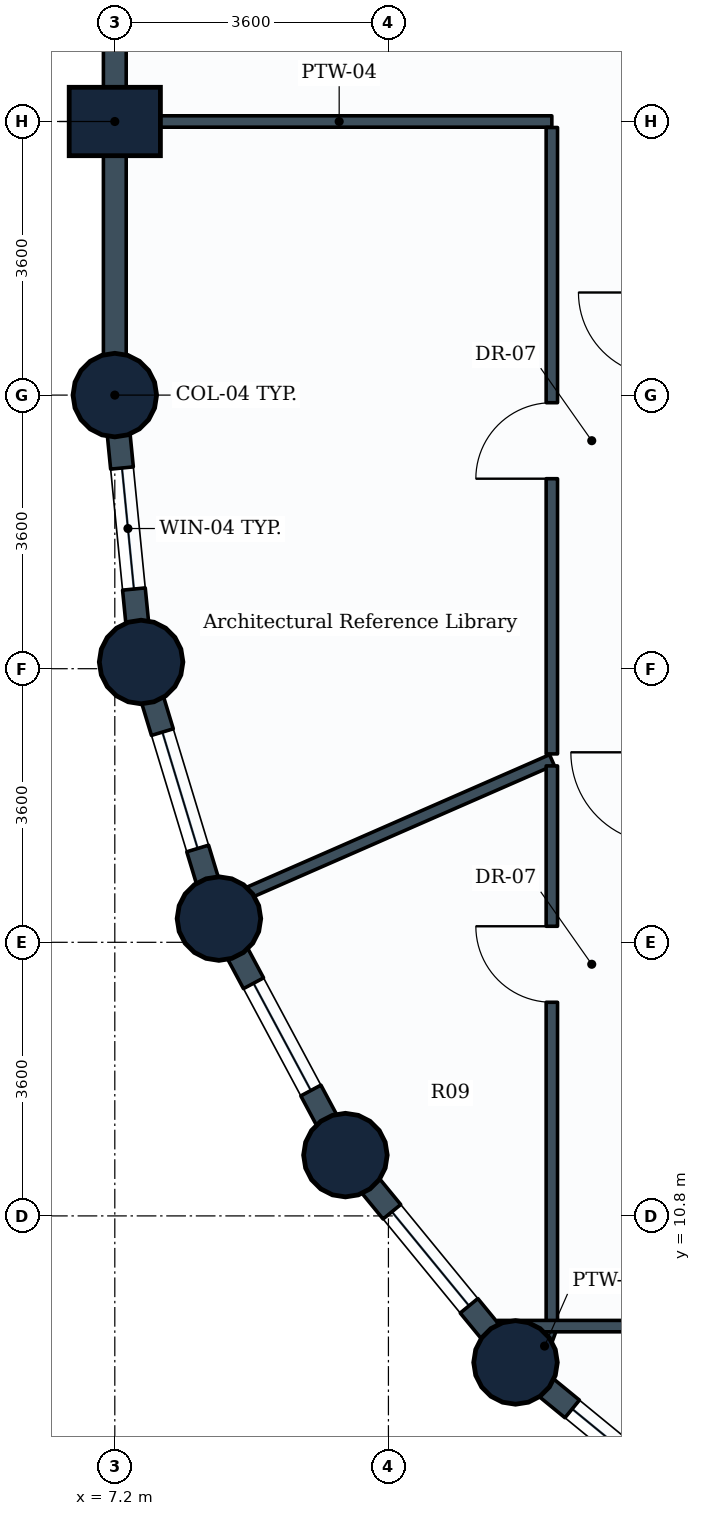
"""IFC4 building model, lengths in metres.
Left out: names, types, materials, properties, quantities, classifications, styles, units other than length and angle.
Written with IfcOpenShell. Run it as: python <this file> out.ifc"""

import sys

from ifc_helpers import new_model, si_unit, direction, frame, frame_2d, origin, origin_2d, place, context, subcontext, project, spatial, rectangle, circle, extrude, element, fill, save


model = new_model("IFC4")
c1 = context("Model", 3, precision=1e-05, world=origin(), true_north=direction((0.0, 1.0)))
c2 = subcontext(c1, "Body", "Model", "MODEL_VIEW")
j1 = project(units=[si_unit("LENGTHUNIT", "METRE"), si_unit("PLANEANGLEUNIT", "RADIAN")], contexts=[c1])
p1 = place(None, origin())
s1 = spatial("IfcSite", under=j1, at=p1, CompositionType="ELEMENT")
p2 = place(p1, origin())
s2 = spatial("IfcBuilding", under=s1, at=p2, CompositionType="ELEMENT")
p3 = place(p2, frame((0.0, 0.0, 35.7)))
s3 = spatial("IfcBuildingStorey", under=s2, at=p3, CompositionType="ELEMENT", Elevation=35.7)
p4 = place(p3, frame((7.2, 21.6, 0.0), z_axis=(0.0, 0.0, 1.0), x_axis=(1.0, 0.0, 0.0)))
e1 = element("IfcColumn", 1, at=p4, inside=s3, PredefinedType="COLUMN", context=c2, shape_type="SweptSolid", body=[
    extrude(circle(Radius=0.55, at=origin_2d()), origin(), (0.0, 0.0, 1.0), 3.9),
])
p5 = place(p3, frame((7.2, 25.2, 0.0), z_axis=(0.0, 0.0, 1.0), x_axis=(0.0, 1.0, 0.0)))
e2 = element("IfcColumn", 2, at=p5, inside=s3, PredefinedType="COLUMN", context=c2, shape_type="SweptSolid", body=[
    extrude(rectangle(XDim=0.9, YDim=1.2, at=origin_2d()), origin(), (0.0, 0.0, 1.0), 3.9),
])
for number, where, z_axis, x_axis in (
    (3, (7.546, 18.088, 0.0), (0.0, 0.0, 1.0), (1.0, 0.0, 0.0)),
    (4, (8.57, 14.712, 0.0), (0.0, 0.0, 1.0), (1.0, 0.0, 0.0)),
    (5, (10.234, 11.6, 0.0), (0.0, 0.0, 1.0), (1.0, 0.0, 0.0)),
    (6, (12.472, 8.872, 0.0), (0.0, 0.0, 1.0), (1.0, 0.0, 0.0)),
):
    element("IfcColumn", number, at=place(p3, frame(where, z_axis=z_axis, x_axis=x_axis)), inside=s3, PredefinedType="COLUMN", context=c2, shape_type="SweptSolid", body=[
        extrude(circle(Radius=0.55, at=origin_2d()), origin(), (0.0, 0.0, 1.0), 3.9),
    ])
p6 = place(p3, frame((7.2, 25.2, 0.0), z_axis=(0.0, 0.0, 1.0), x_axis=(0.0, 1.0, 0.0)))
e7 = element("IfcWall", 7, at=p6, inside=s3, PredefinedType="STANDARD", context=c2, shape_type="SweptSolid", body=[
    extrude(rectangle(XDim=3.6, YDim=0.3, at=frame_2d((1.8, 0.0))), origin(), (0.0, 0.0, 1.0), 2.93),
])
p7 = place(p3, frame((7.2, 21.6, 0.0), z_axis=(0.0, 0.0, 1.0), x_axis=(0.0, 1.0, 0.0)))
e8 = element("IfcWall", 8, at=p7, inside=s3, PredefinedType="STANDARD", context=c2, shape_type="SweptSolid", body=[
    extrude(rectangle(XDim=3.6, YDim=0.3, at=frame_2d((1.8, 0.0))), origin(), (0.0, 0.0, 1.0), 2.93),
])
p8 = place(p3, frame((7.546, 18.088, 0.0), z_axis=(0.0, 0.0, 1.0), x_axis=(-0.09802417461, 0.995184033831, 0.0)))
e9 = element("IfcWall", 9, at=p8, inside=s3, PredefinedType="STANDARD", context=c2, shape_type="SweptSolid", body=[
    extrude(rectangle(XDim=3.529, YDim=0.3, at=frame_2d((1.765, 0.0))), origin(), (0.0, 0.0, 1.0), 2.93),
])
p9 = place(p8, frame((0.965, 0.0, 0.85)))
e10 = element("IfcOpeningElement", 10, at=p9, cuts=e9, PredefinedType="OPENING", context=c2, shape_type="SweptSolid", body=[
    extrude(rectangle(XDim=1.6, YDim=1.35, at=frame_2d((0.8, 0.675))), frame((0.0, 0.16, 0.0), z_axis=(0.0, -1.0, 0.0), x_axis=(1.0, 0.0, 0.0)), (0.0, 0.0, 1.0), 0.32),
])
p10 = place(p3, frame((8.57, 14.712, 0.0), z_axis=(0.0, 0.0, 1.0), x_axis=(-0.290305086481, 0.956934144423, 0.0)))
e11 = element("IfcWall", 11, at=p10, inside=s3, PredefinedType="STANDARD", context=c2, shape_type="SweptSolid", body=[
    extrude(rectangle(XDim=3.528, YDim=0.3, at=frame_2d((1.764, 0.0))), origin(), (0.0, 0.0, 1.0), 2.93),
])
p11 = place(p10, frame((0.964, 0.0, 0.85)))
e12 = element("IfcOpeningElement", 12, at=p11, cuts=e11, PredefinedType="OPENING", context=c2, shape_type="SweptSolid", body=[
    extrude(rectangle(XDim=1.6, YDim=1.35, at=frame_2d((0.8, 0.675))), frame((0.0, 0.16, 0.0), z_axis=(0.0, -1.0, 0.0), x_axis=(1.0, 0.0, 0.0)), (0.0, 0.0, 1.0), 0.32),
])
p12 = place(p3, frame((10.234, 11.6, 0.0), z_axis=(0.0, 0.0, 1.0), x_axis=(-0.47151087309, 0.881860247748, 0.0)))
e13 = element("IfcWall", 13, at=p12, inside=s3, PredefinedType="STANDARD", context=c2, shape_type="SweptSolid", body=[
    extrude(rectangle(XDim=3.529, YDim=0.3, at=frame_2d((1.764, 0.0))), origin(), (0.0, 0.0, 1.0), 2.93),
])
p13 = place(p12, frame((0.964, 0.0, 0.85)))
e14 = element("IfcOpeningElement", 14, at=p13, cuts=e13, PredefinedType="OPENING", context=c2, shape_type="SweptSolid", body=[
    extrude(rectangle(XDim=1.6, YDim=1.35, at=frame_2d((0.8, 0.675))), frame((0.0, 0.16, 0.0), z_axis=(0.0, -1.0, 0.0), x_axis=(1.0, 0.0, 0.0)), (0.0, 0.0, 1.0), 0.32),
])
p14 = place(p3, frame((12.472, 8.872, 0.0), z_axis=(0.0, 0.0, 1.0), x_axis=(-0.634258295121, 0.773121216285, 0.0)))
e15 = element("IfcWall", 15, at=p14, inside=s3, PredefinedType="STANDARD", context=c2, shape_type="SweptSolid", body=[
    extrude(rectangle(XDim=3.529, YDim=0.3, at=frame_2d((1.764, 0.0))), origin(), (0.0, 0.0, 1.0), 2.93),
])
p15 = place(p14, frame((0.964, 0.0, 0.85)))
e16 = element("IfcOpeningElement", 16, at=p15, cuts=e15, PredefinedType="OPENING", context=c2, shape_type="SweptSolid", body=[
    extrude(rectangle(XDim=1.6, YDim=1.35, at=frame_2d((0.8, 0.675))), frame((0.0, 0.16, 0.0), z_axis=(0.0, -1.0, 0.0), x_axis=(1.0, 0.0, 0.0)), (0.0, 0.0, 1.0), 0.32),
])
p16 = place(p3, frame((15.2, 6.634, 0.0), z_axis=(0.0, 0.0, 1.0), x_axis=(-0.773121216285, 0.634258295121, 0.0)))
e17 = element("IfcWall", 17, at=p16, inside=s3, PredefinedType="STANDARD", context=c2, shape_type="SweptSolid", body=[
    extrude(rectangle(XDim=3.529, YDim=0.3, at=frame_2d((1.764, 0.0))), origin(), (0.0, 0.0, 1.0), 2.93),
])
p17 = place(p16, frame((0.964, 0.0, 0.85)))
e18 = element("IfcOpeningElement", 18, at=p17, cuts=e17, PredefinedType="OPENING", context=c2, shape_type="SweptSolid", body=[
    extrude(rectangle(XDim=1.6, YDim=1.35, at=frame_2d((0.8, 0.675))), frame((0.0, 0.16, 0.0), z_axis=(0.0, -1.0, 0.0), x_axis=(1.0, 0.0, 0.0)), (0.0, 0.0, 1.0), 0.32),
])
p18 = place(p3, frame((7.354, 25.2, 0.0), z_axis=(0.0, 0.0, 1.0), x_axis=(1.0, 0.0, 0.0)))
e19 = element("IfcWall", 19, at=p18, inside=s3, PredefinedType="PARTITIONING", context=c2, shape_type="SweptSolid", body=[
    extrude(rectangle(XDim=5.596, YDim=0.15, at=frame_2d((2.798, 0.0))), origin(), (0.0, 0.0, 1.0), 3.635),
])
p19 = place(p3, frame((12.95, 16.8, 0.0), z_axis=(0.0, 0.0, 1.0), x_axis=(-0.916088262031, -0.400976677837, 0.0)))
e20 = element("IfcWall", 20, at=p19, inside=s3, PredefinedType="PARTITIONING", context=c2, shape_type="SweptSolid", body=[
    extrude(rectangle(XDim=4.706, YDim=0.15, at=frame_2d((2.353, 0.0))), origin(), (0.0, 0.0, 1.0), 2.93),
])
p20 = place(p3, frame((12.95, 9.35, 0.0), z_axis=(0.0, 0.0, 1.0), x_axis=(-0.341918365566, -0.939729658619, 0.0)))
e21 = element("IfcWall", 21, at=p20, inside=s3, PredefinedType="PARTITIONING", context=c2, shape_type="SweptSolid", body=[
    extrude(rectangle(XDim=0.559, YDim=0.15, at=frame_2d((0.28, 0.0))), origin(), (0.0, 0.0, 1.0), 2.93),
])
p21 = place(p3, frame((12.95, 16.879, 0.0), z_axis=(0.0, 0.0, 1.0), x_axis=(0.0, 1.0, 0.0)))
e22 = element("IfcWall", 22, at=p21, inside=s3, PredefinedType="PARTITIONING", context=c2, shape_type="SweptSolid", body=[
    extrude(rectangle(XDim=8.242, YDim=0.15, at=frame_2d((4.121, 0.0))), origin(), (0.0, 0.0, 1.0), 3.08),
])
p22 = place(p21, frame((3.621, 0.0, 0.0)))
e23 = element("IfcOpeningElement", 23, at=p22, cuts=e22, PredefinedType="OPENING", context=c2, shape_type="SweptSolid", body=[
    extrude(rectangle(XDim=1.0, YDim=2.1, at=frame_2d((0.5, 1.05))), frame((0.0, 0.085, 0.0), z_axis=(0.0, -1.0, 0.0), x_axis=(1.0, 0.0, 0.0)), (0.0, 0.0, 1.0), 0.17),
])
p23 = place(p3, frame((12.95, 9.35, 0.0), z_axis=(0.0, 0.0, 1.0), x_axis=(0.0, 1.0, 0.0)))
e24 = element("IfcWall", 24, at=p23, inside=s3, PredefinedType="PARTITIONING", context=c2, shape_type="SweptSolid", body=[
    extrude(rectangle(XDim=7.371, YDim=0.15, at=frame_2d((3.686, 0.0))), origin(), (0.0, 0.0, 1.0), 3.04),
])
p24 = place(p23, frame((4.261, 0.0, 0.0)))
e25 = element("IfcOpeningElement", 25, at=p24, cuts=e24, PredefinedType="OPENING", context=c2, shape_type="SweptSolid", body=[
    extrude(rectangle(XDim=1.0, YDim=2.1, at=frame_2d((0.5, 1.05))), frame((0.0, 0.085, 0.0), z_axis=(0.0, -1.0, 0.0), x_axis=(1.0, 0.0, 0.0)), (0.0, 0.0, 1.0), 0.17),
])
p25 = place(p3, frame((12.234, 9.35, 0.0), z_axis=(0.0, 0.0, 1.0), x_axis=(1.0, 0.0, 0.0)))
e26 = element("IfcWall", 26, at=p25, inside=s3, PredefinedType="PARTITIONING", context=c2, shape_type="SweptSolid", body=[
    extrude(rectangle(XDim=8.087, YDim=0.15, at=frame_2d((4.043, 0.0))), origin(), (0.0, 0.0, 1.0), 2.93),
])
p26 = place(p25, frame((4.977, 0.0, 0.0)))
e27 = element("IfcOpeningElement", 27, at=p26, cuts=e26, PredefinedType="OPENING", context=c2, shape_type="SweptSolid", body=[
    extrude(rectangle(XDim=1.0, YDim=2.1, at=frame_2d((0.5, 1.05))), frame((0.0, 0.085, 0.0), z_axis=(0.0, -1.0, 0.0), x_axis=(1.0, 0.0, 0.0)), (0.0, 0.0, 1.0), 0.17),
])
p27 = place(p9, origin())
e28 = element("IfcWindow", 28, at=p27, inside=s3, PartitioningType="SINGLE_PANEL", PredefinedType="WINDOW", context=c2, shape_type="SweptSolid", body=[
    extrude(rectangle(XDim=1.6, YDim=1.35, at=frame_2d((0.8, 0.675))), frame((0.0, 0.03, 0.0), z_axis=(0.0, -1.0, 0.0), x_axis=(1.0, 0.0, 0.0)), (0.0, 0.0, 1.0), 0.06),
])
fill(e10, e28)
p28 = place(p11, origin())
e29 = element("IfcWindow", 29, at=p28, inside=s3, PartitioningType="SINGLE_PANEL", PredefinedType="WINDOW", context=c2, shape_type="SweptSolid", body=[
    extrude(rectangle(XDim=1.6, YDim=1.35, at=frame_2d((0.8, 0.675))), frame((0.0, 0.03, 0.0), z_axis=(0.0, -1.0, 0.0), x_axis=(1.0, 0.0, 0.0)), (0.0, 0.0, 1.0), 0.06),
])
fill(e12, e29)
p29 = place(p13, origin())
e30 = element("IfcWindow", 30, at=p29, inside=s3, PartitioningType="SINGLE_PANEL", PredefinedType="WINDOW", context=c2, shape_type="SweptSolid", body=[
    extrude(rectangle(XDim=1.6, YDim=1.35, at=frame_2d((0.8, 0.675))), frame((0.0, 0.03, 0.0), z_axis=(0.0, -1.0, 0.0), x_axis=(1.0, 0.0, 0.0)), (0.0, 0.0, 1.0), 0.06),
])
fill(e14, e30)
p30 = place(p15, origin())
e31 = element("IfcWindow", 31, at=p30, inside=s3, PartitioningType="SINGLE_PANEL", PredefinedType="WINDOW", context=c2, shape_type="SweptSolid", body=[
    extrude(rectangle(XDim=1.6, YDim=1.35, at=frame_2d((0.8, 0.675))), frame((0.0, 0.03, 0.0), z_axis=(0.0, -1.0, 0.0), x_axis=(1.0, 0.0, 0.0)), (0.0, 0.0, 1.0), 0.06),
])
fill(e16, e31)
p31 = place(p17, origin())
e32 = element("IfcWindow", 32, at=p31, inside=s3, PartitioningType="SINGLE_PANEL", PredefinedType="WINDOW", context=c2, shape_type="SweptSolid", body=[
    extrude(rectangle(XDim=1.6, YDim=1.35, at=frame_2d((0.8, 0.675))), frame((0.0, 0.03, 0.0), z_axis=(0.0, -1.0, 0.0), x_axis=(1.0, 0.0, 0.0)), (0.0, 0.0, 1.0), 0.06),
])
fill(e18, e32)
p32 = place(p22, origin())
e33 = element("IfcDoor", 33, at=p32, inside=s3, OperationType="SINGLE_SWING_LEFT", PredefinedType="DOOR", context=c2, shape_type="SweptSolid", body=[
    extrude(rectangle(XDim=1.0, YDim=2.1, at=frame_2d((0.5, 1.05))), frame((0.0, 0.025, 0.0), z_axis=(0.0, -1.0, 0.0), x_axis=(1.0, 0.0, 0.0)), (0.0, 0.0, 1.0), 0.05),
])
fill(e23, e33)
p33 = place(p24, origin())
e34 = element("IfcDoor", 34, at=p33, inside=s3, OperationType="SINGLE_SWING_RIGHT", PredefinedType="DOOR", context=c2, shape_type="SweptSolid", body=[
    extrude(rectangle(XDim=1.0, YDim=2.1, at=frame_2d((0.5, 1.05))), frame((0.0, 0.025, 0.0), z_axis=(0.0, -1.0, 0.0), x_axis=(1.0, 0.0, 0.0)), (0.0, 0.0, 1.0), 0.05),
])
fill(e25, e34)
save(model, sys.argv[1])
